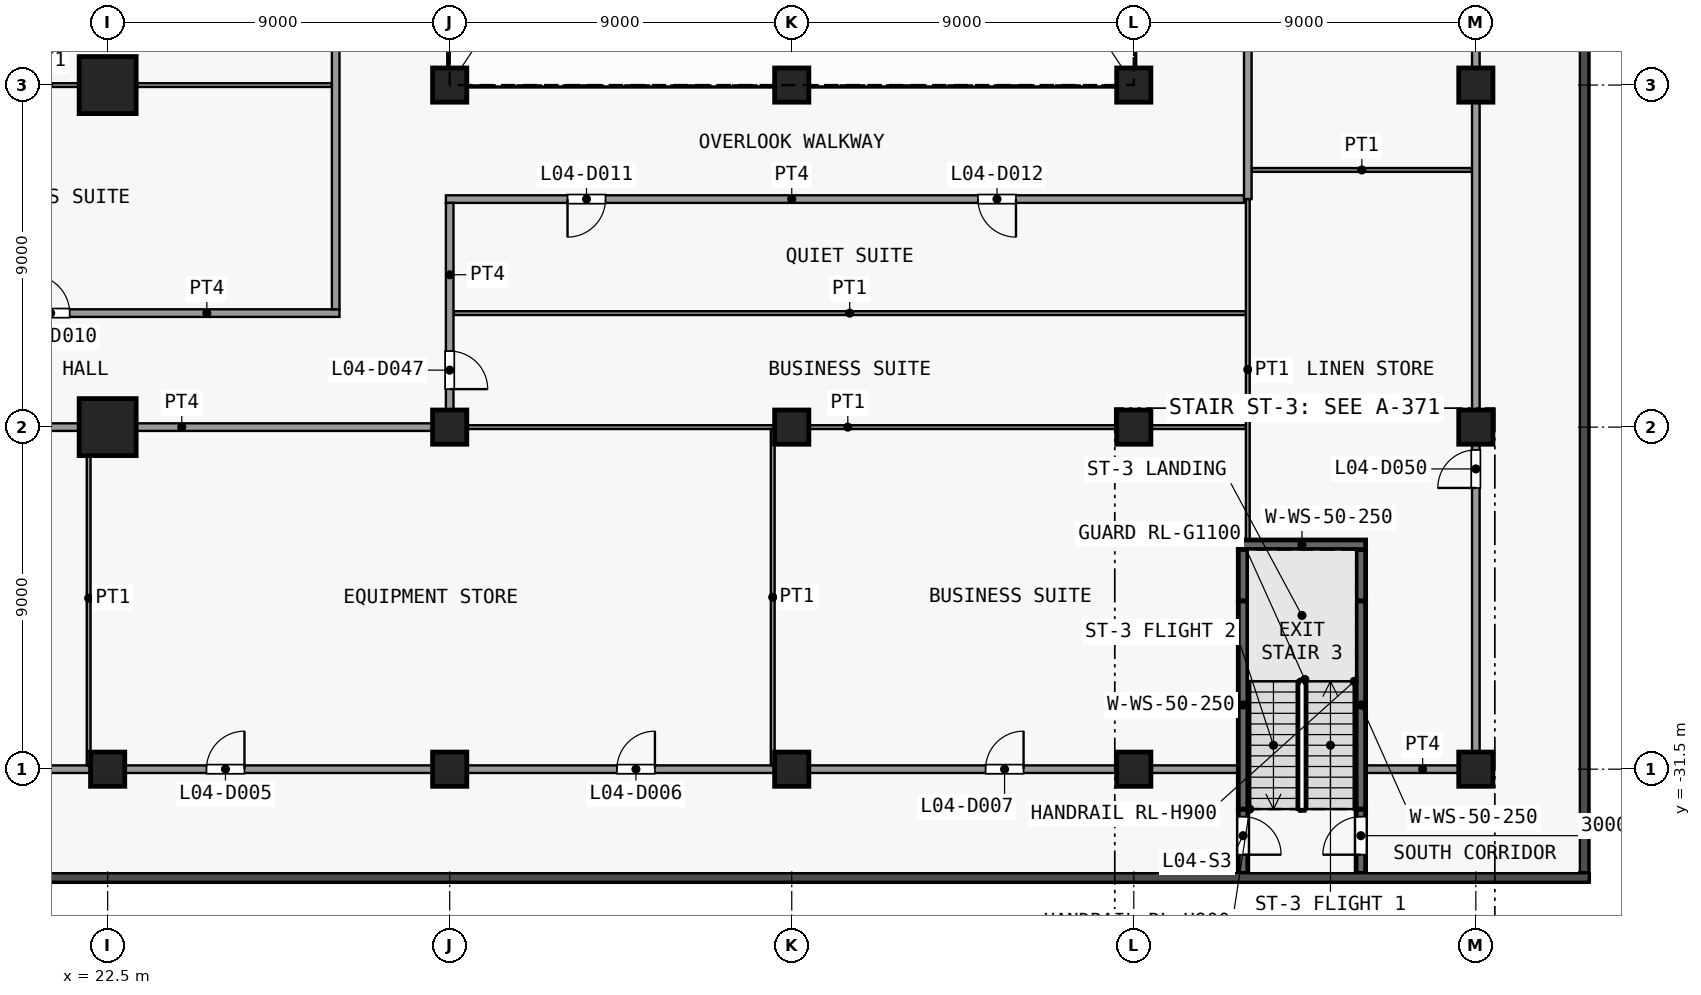
"""IFC4 building model, lengths in metres.
Left out: names, types, materials, properties, quantities, classifications, styles, units other than length and angle.
Written with IfcOpenShell. Run it as: python <this file> out.ifc"""

import sys

from ifc_helpers import new_model, si_unit, direction, frame, frame_2d, origin, origin_2d, place, context, subcontext, project, spatial, rectangle, extrude, element, fill, save


model = new_model("IFC4")
c1 = context("Model", 3, precision=1e-05, world=origin(), true_north=direction((0.0, 1.0)))
c2 = subcontext(c1, "Body", "Model", "MODEL_VIEW")
j1 = project(units=[si_unit("LENGTHUNIT", "METRE"), si_unit("PLANEANGLEUNIT", "RADIAN")], contexts=[c1])
p1 = place(None, origin())
s1 = spatial("IfcSite", under=j1, at=p1, CompositionType="ELEMENT")
p2 = place(p1, origin())
s2 = spatial("IfcBuilding", under=s1, at=p2, CompositionType="ELEMENT")
p3 = place(p2, frame((0.0, 0.0, 23.5)))
s3 = spatial("IfcBuildingStorey", under=s2, at=p3, CompositionType="ELEMENT", Elevation=23.5)
p4 = place(p3, frame((22.5, -31.5, 0.0), z_axis=(0.0, 0.0, 1.0), x_axis=(1.0, 0.0, 0.0)))
e1 = element("IfcColumn", 1, at=p4, inside=s3, PredefinedType="COLUMN", context=c2, shape_type="SweptSolid", body=[
    extrude(rectangle(XDim=0.9, YDim=0.9, at=origin_2d()), origin(), (0.0, 0.0, 1.0), 4.5),
])
for number, where, z_axis, x_axis in (
    (2, (22.5, -22.5, 0.0), (0.0, 0.0, 1.0), (1.0, 0.0, 0.0)),
    (3, (22.5, -13.5, 0.0), (0.0, 0.0, 1.0), (1.0, 0.0, 0.0)),
):
    element("IfcColumn", number, at=place(p3, frame(where, z_axis=z_axis, x_axis=x_axis)), inside=s3, PredefinedType="COLUMN", context=c2, shape_type="SweptSolid", body=[
        extrude(rectangle(XDim=1.5, YDim=1.5, at=origin_2d()), origin(), (0.0, 0.0, 1.0), 4.5),
    ])
for number, where, z_axis, x_axis in (
    (4, (31.5, -31.5, 0.0), (0.0, 0.0, 1.0), (1.0, 0.0, 0.0)),
    (5, (31.5, -22.5, 0.0), (0.0, 0.0, 1.0), (1.0, 0.0, 0.0)),
    (6, (31.5, -13.5, 0.0), (0.0, 0.0, 1.0), (1.0, 0.0, 0.0)),
    (7, (40.5, -31.5, 0.0), (0.0, 0.0, 1.0), (1.0, 0.0, 0.0)),
    (8, (40.5, -22.5, 0.0), (0.0, 0.0, 1.0), (1.0, 0.0, 0.0)),
    (9, (40.5, -13.5, 0.0), (0.0, 0.0, 1.0), (1.0, 0.0, 0.0)),
    (10, (49.5, -31.5, 0.0), (0.0, 0.0, 1.0), (1.0, 0.0, 0.0)),
    (11, (49.5, -22.5, 0.0), (0.0, 0.0, 1.0), (1.0, 0.0, 0.0)),
    (12, (49.5, -13.5, 0.0), (0.0, 0.0, 1.0), (1.0, 0.0, 0.0)),
    (13, (58.5, -31.5, 0.0), (0.0, 0.0, 1.0), (1.0, 0.0, 0.0)),
    (14, (58.5, -22.5, 0.0), (0.0, 0.0, 1.0), (1.0, 0.0, 0.0)),
    (15, (58.5, -13.5, 0.0), (0.0, 0.0, 1.0), (1.0, 0.0, 0.0)),
):
    element("IfcColumn", number, at=place(p3, frame(where, z_axis=z_axis, x_axis=x_axis)), inside=s3, PredefinedType="COLUMN", context=c2, shape_type="SweptSolid", body=[
        extrude(rectangle(XDim=0.9, YDim=0.9, at=origin_2d()), origin(), (0.0, 0.0, 1.0), 4.5),
    ])
p5 = place(p3, frame((52.375, -32.55, 0.0), z_axis=(0.0, 0.0, 1.0), x_axis=(0.0, -1.0, 0.0)))
e16 = element("IfcWall", 16, at=p5, inside=s3, PredefinedType="SHEAR", context=c2, shape_type="SweptSolid", body=[
    extrude(rectangle(XDim=1.69, YDim=0.25, at=frame_2d((0.845, 0.0))), origin(), (0.0, 0.0, 1.0), 4.15),
])
p6 = place(p5, frame((0.2, 0.0, 0.0)))
e17 = element("IfcOpeningElement", 17, at=p6, cuts=e16, PredefinedType="OPENING", context=c2, shape_type="SweptSolid", body=[
    extrude(rectangle(XDim=1.0, YDim=2.1, at=frame_2d((0.5, 1.05))), frame((0.0, 0.135, 0.0), z_axis=(0.0, -1.0, 0.0), x_axis=(1.0, 0.0, 0.0)), (0.0, 0.0, 1.0), 0.27),
])
p7 = place(p3, frame((52.375, -32.55, 0.0), z_axis=(0.0, 0.0, 1.0), x_axis=(0.0, 1.0, 0.0)))
e18 = element("IfcWall", 18, at=p7, inside=s3, PredefinedType="SHEAR", context=c2, shape_type="SweptSolid", body=[
    extrude(rectangle(XDim=5.48, YDim=0.25, at=frame_2d((2.74, 0.0))), origin(), (0.0, 0.0, 1.0), 4.15),
])
p8 = place(p3, frame((52.375, -27.07, 0.0), z_axis=(0.0, 0.0, 1.0), x_axis=(0.0, 1.0, 0.0)))
e19 = element("IfcWall", 19, at=p8, inside=s3, PredefinedType="SHEAR", context=c2, shape_type="SweptSolid", body=[
    extrude(rectangle(XDim=1.35, YDim=0.25, at=frame_2d((0.675, 0.0))), origin(), (0.0, 0.0, 1.0), 4.15),
])
p9 = place(p3, frame((55.475, -34.24, 0.0), z_axis=(0.0, 0.0, 1.0), x_axis=(0.0, 1.0, 0.0)))
e20 = element("IfcWall", 20, at=p9, inside=s3, PredefinedType="SHEAR", context=c2, shape_type="SweptSolid", body=[
    extrude(rectangle(XDim=1.69, YDim=0.25, at=frame_2d((0.845, 0.0))), origin(), (0.0, 0.0, 1.0), 4.15),
])
p10 = place(p9, frame((0.49, 0.0, 0.0)))
e21 = element("IfcOpeningElement", 21, at=p10, cuts=e20, PredefinedType="OPENING", context=c2, shape_type="SweptSolid", body=[
    extrude(rectangle(XDim=1.0, YDim=2.1, at=frame_2d((0.5, 1.05))), frame((0.0, 0.135, 0.0), z_axis=(0.0, -1.0, 0.0), x_axis=(1.0, 0.0, 0.0)), (0.0, 0.0, 1.0), 0.27),
])
p11 = place(p3, frame((55.475, -32.55, 0.0), z_axis=(0.0, 0.0, 1.0), x_axis=(0.0, 1.0, 0.0)))
e22 = element("IfcWall", 22, at=p11, inside=s3, PredefinedType="SHEAR", context=c2, shape_type="SweptSolid", body=[
    extrude(rectangle(XDim=5.48, YDim=0.25, at=frame_2d((2.74, 0.0))), origin(), (0.0, 0.0, 1.0), 4.15),
])
p12 = place(p3, frame((55.475, -27.07, 0.0), z_axis=(0.0, 0.0, 1.0), x_axis=(0.0, 1.0, 0.0)))
e23 = element("IfcWall", 23, at=p12, inside=s3, PredefinedType="SHEAR", context=c2, shape_type="SweptSolid", body=[
    extrude(rectangle(XDim=1.35, YDim=0.25, at=frame_2d((0.675, 0.0))), origin(), (0.0, 0.0, 1.0), 4.15),
])
p13 = place(p3, frame((52.25, -25.595, 0.0), z_axis=(0.0, 0.0, 1.0), x_axis=(1.0, 0.0, 0.0)))
e24 = element("IfcWall", 24, at=p13, inside=s3, PredefinedType="SHEAR", context=c2, shape_type="SweptSolid", body=[
    extrude(rectangle(XDim=3.35, YDim=0.25, at=frame_2d((1.675, 0.0))), origin(), (0.0, 0.0, 1.0), 4.15),
])
p14 = place(p3, frame((-25.9, -31.5, 0.0), z_axis=(0.0, 0.0, 1.0), x_axis=(1.0, 0.0, 0.0)))
e25 = element("IfcWall", 25, at=p14, inside=s3, PredefinedType="PARTITIONING", context=c2, shape_type="SweptSolid", body=[
    extrude(rectangle(XDim=78.15, YDim=0.2, at=frame_2d((39.075, 0.0))), origin(), (0.0, 0.0, 1.0), 4.15),
])
p15 = place(p14, frame((4.3, 0.0, 0.0)))
e26 = element("IfcOpeningElement", 26, at=p15, cuts=e25, PredefinedType="OPENING", context=c2, shape_type="SweptSolid", body=[
    extrude(rectangle(XDim=1.0, YDim=2.1, at=frame_2d((0.5, 1.05))), frame((0.0, 0.11, 0.0), z_axis=(0.0, -1.0, 0.0), x_axis=(1.0, 0.0, 0.0)), (0.0, 0.0, 1.0), 0.22),
])
p16 = place(p14, frame((18.6, 0.0, 0.0)))
e27 = element("IfcOpeningElement", 27, at=p16, cuts=e25, PredefinedType="OPENING", context=c2, shape_type="SweptSolid", body=[
    extrude(rectangle(XDim=1.0, YDim=2.1, at=frame_2d((0.5, 1.05))), frame((0.0, 0.11, 0.0), z_axis=(0.0, -1.0, 0.0), x_axis=(1.0, 0.0, 0.0)), (0.0, 0.0, 1.0), 0.22),
])
p17 = place(p14, frame((28.2, 0.0, 0.0)))
e28 = element("IfcOpeningElement", 28, at=p17, cuts=e25, PredefinedType="OPENING", context=c2, shape_type="SweptSolid", body=[
    extrude(rectangle(XDim=1.0, YDim=2.1, at=frame_2d((0.5, 1.05))), frame((0.0, 0.11, 0.0), z_axis=(0.0, -1.0, 0.0), x_axis=(1.0, 0.0, 0.0)), (0.0, 0.0, 1.0), 0.22),
])
p18 = place(p14, frame((43.0, 0.0, 0.0)))
e29 = element("IfcOpeningElement", 29, at=p18, cuts=e25, PredefinedType="OPENING", context=c2, shape_type="SweptSolid", body=[
    extrude(rectangle(XDim=1.0, YDim=2.1, at=frame_2d((0.5, 1.05))), frame((0.0, 0.11, 0.0), z_axis=(0.0, -1.0, 0.0), x_axis=(1.0, 0.0, 0.0)), (0.0, 0.0, 1.0), 0.22),
])
p19 = place(p14, frame((51.0, 0.0, 0.0)))
e30 = element("IfcOpeningElement", 30, at=p19, cuts=e25, PredefinedType="OPENING", context=c2, shape_type="SweptSolid", body=[
    extrude(rectangle(XDim=1.0, YDim=2.1, at=frame_2d((0.5, 1.05))), frame((0.0, 0.11, 0.0), z_axis=(0.0, -1.0, 0.0), x_axis=(1.0, 0.0, 0.0)), (0.0, 0.0, 1.0), 0.22),
])
p20 = place(p14, frame((61.8, 0.0, 0.0)))
e31 = element("IfcOpeningElement", 31, at=p20, cuts=e25, PredefinedType="OPENING", context=c2, shape_type="SweptSolid", body=[
    extrude(rectangle(XDim=1.0, YDim=2.1, at=frame_2d((0.5, 1.05))), frame((0.0, 0.11, 0.0), z_axis=(0.0, -1.0, 0.0), x_axis=(1.0, 0.0, 0.0)), (0.0, 0.0, 1.0), 0.22),
])
p21 = place(p14, frame((71.5, 0.0, 0.0)))
e32 = element("IfcOpeningElement", 32, at=p21, cuts=e25, PredefinedType="OPENING", context=c2, shape_type="SweptSolid", body=[
    extrude(rectangle(XDim=1.0, YDim=2.1, at=frame_2d((0.5, 1.05))), frame((0.0, 0.11, 0.0), z_axis=(0.0, -1.0, 0.0), x_axis=(1.0, 0.0, 0.0)), (0.0, 0.0, 1.0), 0.22),
])
p22 = place(p3, frame((55.6, -31.5, 0.0), z_axis=(0.0, 0.0, 1.0), x_axis=(1.0, 0.0, 0.0)))
e33 = element("IfcWall", 33, at=p22, inside=s3, PredefinedType="PARTITIONING", context=c2, shape_type="SweptSolid", body=[
    extrude(rectangle(XDim=3.0, YDim=0.2, at=frame_2d((1.5, 0.0))), origin(), (0.0, 0.0, 1.0), 4.15),
])
p23 = place(p3, frame((17.4, -22.5, 0.0), z_axis=(0.0, 0.0, 1.0), x_axis=(1.0, 0.0, 0.0)))
e34 = element("IfcWall", 34, at=p23, inside=s3, PredefinedType="PARTITIONING", context=c2, shape_type="SweptSolid", body=[
    extrude(rectangle(XDim=14.1, YDim=0.2, at=frame_2d((7.05, 0.0))), origin(), (0.0, 0.0, 1.0), 4.15),
])
p24 = place(p3, frame((31.5, -22.5, 0.0), z_axis=(0.0, 0.0, 1.0), x_axis=(1.0, 0.0, 0.0)))
e35 = element("IfcWall", 35, at=p24, inside=s3, PredefinedType="PARTITIONING", context=c2, shape_type="SweptSolid", body=[
    extrude(rectangle(XDim=20.95, YDim=0.1, at=frame_2d((10.475, 0.0))), origin(), (0.0, 0.0, 1.0), 4.15),
])
p25 = place(p3, frame((13.5, -19.5, 0.0), z_axis=(0.0, 0.0, 1.0), x_axis=(1.0, 0.0, 0.0)))
e36 = element("IfcWall", 36, at=p25, inside=s3, PredefinedType="PARTITIONING", context=c2, shape_type="SweptSolid", body=[
    extrude(rectangle(XDim=15.1, YDim=0.2, at=frame_2d((7.55, 0.0))), origin(), (0.0, 0.0, 1.0), 4.15),
])
p26 = place(p25, frame((7.0, 0.0, 0.0)))
e37 = element("IfcOpeningElement", 37, at=p26, cuts=e36, PredefinedType="OPENING", context=c2, shape_type="SweptSolid", body=[
    extrude(rectangle(XDim=1.0, YDim=2.1, at=frame_2d((0.5, 1.05))), frame((0.0, 0.11, 0.0), z_axis=(0.0, -1.0, 0.0), x_axis=(1.0, 0.0, 0.0)), (0.0, 0.0, 1.0), 0.22),
])
p27 = place(p3, frame((31.6, -19.5, 0.0), z_axis=(0.0, 0.0, 1.0), x_axis=(1.0, 0.0, 0.0)))
e38 = element("IfcWall", 38, at=p27, inside=s3, PredefinedType="PARTITIONING", context=c2, shape_type="SweptSolid", body=[
    extrude(rectangle(XDim=20.85, YDim=0.1, at=frame_2d((10.425, 0.0))), origin(), (0.0, 0.0, 1.0), 4.15),
])
p28 = place(p3, frame((31.4, -16.5, 0.0), z_axis=(0.0, 0.0, 1.0), x_axis=(1.0, 0.0, 0.0)))
e39 = element("IfcWall", 39, at=p28, inside=s3, PredefinedType="PARTITIONING", context=c2, shape_type="SweptSolid", body=[
    extrude(rectangle(XDim=21.0, YDim=0.2, at=frame_2d((10.5, 0.0))), origin(), (0.0, 0.0, 1.0), 4.15),
])
p29 = place(p28, frame((3.2, 0.0, 0.0)))
e40 = element("IfcOpeningElement", 40, at=p29, cuts=e39, PredefinedType="OPENING", context=c2, shape_type="SweptSolid", body=[
    extrude(rectangle(XDim=1.0, YDim=2.1, at=frame_2d((0.5, 1.05))), frame((0.0, 0.11, 0.0), z_axis=(0.0, -1.0, 0.0), x_axis=(1.0, 0.0, 0.0)), (0.0, 0.0, 1.0), 0.22),
])
p30 = place(p28, frame((14.0, 0.0, 0.0)))
e41 = element("IfcOpeningElement", 41, at=p30, cuts=e39, PredefinedType="OPENING", context=c2, shape_type="SweptSolid", body=[
    extrude(rectangle(XDim=1.0, YDim=2.1, at=frame_2d((0.5, 1.05))), frame((0.0, 0.11, 0.0), z_axis=(0.0, -1.0, 0.0), x_axis=(1.0, 0.0, 0.0)), (0.0, 0.0, 1.0), 0.22),
])
p31 = place(p3, frame((52.6, -15.733, 0.0), z_axis=(0.0, 0.0, 1.0), x_axis=(1.0, 0.0, 0.0)))
e42 = element("IfcWall", 42, at=p31, inside=s3, PredefinedType="PARTITIONING", context=c2, shape_type="SweptSolid", body=[
    extrude(rectangle(XDim=5.8, YDim=0.1, at=frame_2d((2.9, 0.0))), origin(), (0.0, 0.0, 1.0), 4.15),
])
p32 = place(p3, frame((13.5, -13.5, 0.0), z_axis=(0.0, 0.0, 1.0), x_axis=(1.0, 0.0, 0.0)))
e43 = element("IfcWall", 43, at=p32, inside=s3, PredefinedType="PARTITIONING", context=c2, shape_type="SweptSolid", body=[
    extrude(rectangle(XDim=14.9, YDim=0.1, at=frame_2d((7.45, 0.0))), origin(), (0.0, 0.0, 1.0), 4.15),
])
p33 = place(p3, frame((22.0, -31.4, 0.0), z_axis=(0.0, 0.0, 1.0), x_axis=(0.0, 1.0, 0.0)))
e44 = element("IfcWall", 44, at=p33, inside=s3, PredefinedType="PARTITIONING", context=c2, shape_type="SweptSolid", body=[
    extrude(rectangle(XDim=8.8, YDim=0.1, at=frame_2d((4.4, 0.0))), origin(), (0.0, 0.0, 1.0), 4.15),
])
p34 = place(p3, frame((28.5, -19.4, 0.0), z_axis=(0.0, 0.0, 1.0), x_axis=(0.0, 1.0, 0.0)))
e45 = element("IfcWall", 45, at=p34, inside=s3, PredefinedType="PARTITIONING", context=c2, shape_type="SweptSolid", body=[
    extrude(rectangle(XDim=14.8, YDim=0.2, at=frame_2d((7.4, 0.0))), origin(), (0.0, 0.0, 1.0), 4.15),
])
p35 = place(p3, frame((31.5, -22.4, 0.0), z_axis=(0.0, 0.0, 1.0), x_axis=(0.0, 1.0, 0.0)))
e46 = element("IfcWall", 46, at=p35, inside=s3, PredefinedType="PARTITIONING", context=c2, shape_type="SweptSolid", body=[
    extrude(rectangle(XDim=5.8, YDim=0.2, at=frame_2d((2.9, 0.0))), origin(), (0.0, 0.0, 1.0), 4.15),
])
p36 = place(p35, frame((0.9, 0.0, 0.0)))
e47 = element("IfcOpeningElement", 47, at=p36, cuts=e46, PredefinedType="OPENING", context=c2, shape_type="SweptSolid", body=[
    extrude(rectangle(XDim=1.0, YDim=2.1, at=frame_2d((0.5, 1.05))), frame((0.0, 0.11, 0.0), z_axis=(0.0, -1.0, 0.0), x_axis=(1.0, 0.0, 0.0)), (0.0, 0.0, 1.0), 0.22),
])
p37 = place(p3, frame((40.0, -31.4, 0.0), z_axis=(0.0, 0.0, 1.0), x_axis=(0.0, 1.0, 0.0)))
e48 = element("IfcWall", 48, at=p37, inside=s3, PredefinedType="PARTITIONING", context=c2, shape_type="SweptSolid", body=[
    extrude(rectangle(XDim=8.85, YDim=0.1, at=frame_2d((4.425, 0.0))), origin(), (0.0, 0.0, 1.0), 4.15),
])
p38 = place(p3, frame((52.5, -16.5, 0.0), z_axis=(0.0, 0.0, 1.0), x_axis=(0.0, 1.0, 0.0)))
e49 = element("IfcWall", 49, at=p38, inside=s3, PredefinedType="PARTITIONING", context=c2, shape_type="SweptSolid", body=[
    extrude(rectangle(XDim=32.2, YDim=0.2, at=frame_2d((16.1, 0.0))), origin(), (0.0, 0.0, 1.0), 4.15),
])
p39 = place(p3, frame((52.5, -25.47, 0.0), z_axis=(0.0, 0.0, 1.0), x_axis=(0.0, 1.0, 0.0)))
e50 = element("IfcWall", 50, at=p39, inside=s3, PredefinedType="PARTITIONING", context=c2, shape_type="SweptSolid", body=[
    extrude(rectangle(XDim=8.97, YDim=0.1, at=frame_2d((4.485, 0.0))), origin(), (0.0, 0.0, 1.0), 4.15),
])
p40 = place(p3, frame((58.5, -31.4, 0.0), z_axis=(0.0, 0.0, 1.0), x_axis=(0.0, 1.0, 0.0)))
e51 = element("IfcWall", 51, at=p40, inside=s3, PredefinedType="PARTITIONING", context=c2, shape_type="SweptSolid", body=[
    extrude(rectangle(XDim=47.1, YDim=0.2, at=frame_2d((23.55, 0.0))), origin(), (0.0, 0.0, 1.0), 4.15),
])
p41 = place(p40, frame((7.3, 0.0, 0.0)))
e52 = element("IfcOpeningElement", 52, at=p41, cuts=e51, PredefinedType="OPENING", context=c2, shape_type="SweptSolid", body=[
    extrude(rectangle(XDim=1.0, YDim=2.1, at=frame_2d((0.5, 1.05))), frame((0.0, 0.11, 0.0), z_axis=(0.0, -1.0, 0.0), x_axis=(1.0, 0.0, 0.0)), (0.0, 0.0, 1.0), 0.22),
])
p42 = place(p40, frame((23.067, 0.0, 0.0)))
e53 = element("IfcOpeningElement", 53, at=p42, cuts=e51, PredefinedType="OPENING", context=c2, shape_type="SweptSolid", body=[
    extrude(rectangle(XDim=1.0, YDim=2.1, at=frame_2d((0.5, 1.05))), frame((0.0, 0.11, 0.0), z_axis=(0.0, -1.0, 0.0), x_axis=(1.0, 0.0, 0.0)), (0.0, 0.0, 1.0), 0.22),
])
p43 = place(p40, frame((39.433, 0.0, 0.0)))
e54 = element("IfcOpeningElement", 54, at=p43, cuts=e51, PredefinedType="OPENING", context=c2, shape_type="SweptSolid", body=[
    extrude(rectangle(XDim=1.0, YDim=2.1, at=frame_2d((0.5, 1.05))), frame((0.0, 0.11, 0.0), z_axis=(0.0, -1.0, 0.0), x_axis=(1.0, 0.0, 0.0)), (0.0, 0.0, 1.0), 0.22),
])
p44 = place(p6, origin())
e55 = element("IfcDoor", 55, at=p44, inside=s3, OperationType="SINGLE_SWING_RIGHT", PredefinedType="DOOR", context=c2, shape_type="SweptSolid", body=[
    extrude(rectangle(XDim=1.0, YDim=2.1, at=frame_2d((0.5, 1.05))), frame((0.0, 0.025, 0.0), z_axis=(0.0, -1.0, 0.0), x_axis=(1.0, 0.0, 0.0)), (0.0, 0.0, 1.0), 0.05),
])
fill(e17, e55)
p45 = place(p10, origin())
e56 = element("IfcDoor", 56, at=p45, inside=s3, OperationType="SINGLE_SWING_LEFT", PredefinedType="DOOR", context=c2, shape_type="SweptSolid", body=[
    extrude(rectangle(XDim=1.0, YDim=2.1, at=frame_2d((0.5, 1.05))), frame((0.0, 0.025, 0.0), z_axis=(0.0, -1.0, 0.0), x_axis=(1.0, 0.0, 0.0)), (0.0, 0.0, 1.0), 0.05),
])
fill(e21, e56)
p46 = place(p19, origin())
e57 = element("IfcDoor", 57, at=p46, inside=s3, OperationType="SINGLE_SWING_LEFT", PredefinedType="DOOR", context=c2, shape_type="SweptSolid", body=[
    extrude(rectangle(XDim=1.0, YDim=2.1, at=frame_2d((0.5, 1.05))), frame((0.0, 0.025, 0.0), z_axis=(0.0, -1.0, 0.0), x_axis=(1.0, 0.0, 0.0)), (0.0, 0.0, 1.0), 0.05),
])
fill(e30, e57)
p47 = place(p20, origin())
e58 = element("IfcDoor", 58, at=p47, inside=s3, OperationType="SINGLE_SWING_LEFT", PredefinedType="DOOR", context=c2, shape_type="SweptSolid", body=[
    extrude(rectangle(XDim=1.0, YDim=2.1, at=frame_2d((0.5, 1.05))), frame((0.0, 0.025, 0.0), z_axis=(0.0, -1.0, 0.0), x_axis=(1.0, 0.0, 0.0)), (0.0, 0.0, 1.0), 0.05),
])
fill(e31, e58)
p48 = place(p21, origin())
e59 = element("IfcDoor", 59, at=p48, inside=s3, OperationType="SINGLE_SWING_LEFT", PredefinedType="DOOR", context=c2, shape_type="SweptSolid", body=[
    extrude(rectangle(XDim=1.0, YDim=2.1, at=frame_2d((0.5, 1.05))), frame((0.0, 0.025, 0.0), z_axis=(0.0, -1.0, 0.0), x_axis=(1.0, 0.0, 0.0)), (0.0, 0.0, 1.0), 0.05),
])
fill(e32, e59)
p49 = place(p26, origin())
e60 = element("IfcDoor", 60, at=p49, inside=s3, OperationType="SINGLE_SWING_RIGHT", PredefinedType="DOOR", context=c2, shape_type="SweptSolid", body=[
    extrude(rectangle(XDim=1.0, YDim=2.1, at=frame_2d((0.5, 1.05))), frame((0.0, 0.025, 0.0), z_axis=(0.0, -1.0, 0.0), x_axis=(1.0, 0.0, 0.0)), (0.0, 0.0, 1.0), 0.05),
])
fill(e37, e60)
p50 = place(p29, origin())
e61 = element("IfcDoor", 61, at=p50, inside=s3, OperationType="SINGLE_SWING_LEFT", PredefinedType="DOOR", context=c2, shape_type="SweptSolid", body=[
    extrude(rectangle(XDim=1.0, YDim=2.1, at=frame_2d((0.5, 1.05))), frame((0.0, 0.025, 0.0), z_axis=(0.0, -1.0, 0.0), x_axis=(1.0, 0.0, 0.0)), (0.0, 0.0, 1.0), 0.05),
])
fill(e40, e61)
p51 = place(p30, origin())
e62 = element("IfcDoor", 62, at=p51, inside=s3, OperationType="SINGLE_SWING_RIGHT", PredefinedType="DOOR", context=c2, shape_type="SweptSolid", body=[
    extrude(rectangle(XDim=1.0, YDim=2.1, at=frame_2d((0.5, 1.05))), frame((0.0, 0.025, 0.0), z_axis=(0.0, -1.0, 0.0), x_axis=(1.0, 0.0, 0.0)), (0.0, 0.0, 1.0), 0.05),
])
fill(e41, e62)
p52 = place(p36, origin())
e63 = element("IfcDoor", 63, at=p52, inside=s3, OperationType="SINGLE_SWING_LEFT", PredefinedType="DOOR", context=c2, shape_type="SweptSolid", body=[
    extrude(rectangle(XDim=1.0, YDim=2.1, at=frame_2d((0.5, 1.05))), frame((0.0, 0.025, 0.0), z_axis=(0.0, -1.0, 0.0), x_axis=(1.0, 0.0, 0.0)), (0.0, 0.0, 1.0), 0.05),
])
fill(e47, e63)
p53 = place(p41, origin())
e64 = element("IfcDoor", 64, at=p53, inside=s3, OperationType="SINGLE_SWING_RIGHT", PredefinedType="DOOR", context=c2, shape_type="SweptSolid", body=[
    extrude(rectangle(XDim=1.0, YDim=2.1, at=frame_2d((0.5, 1.05))), frame((0.0, 0.025, 0.0), z_axis=(0.0, -1.0, 0.0), x_axis=(1.0, 0.0, 0.0)), (0.0, 0.0, 1.0), 0.05),
])
fill(e52, e64)
save(model, sys.argv[1])
